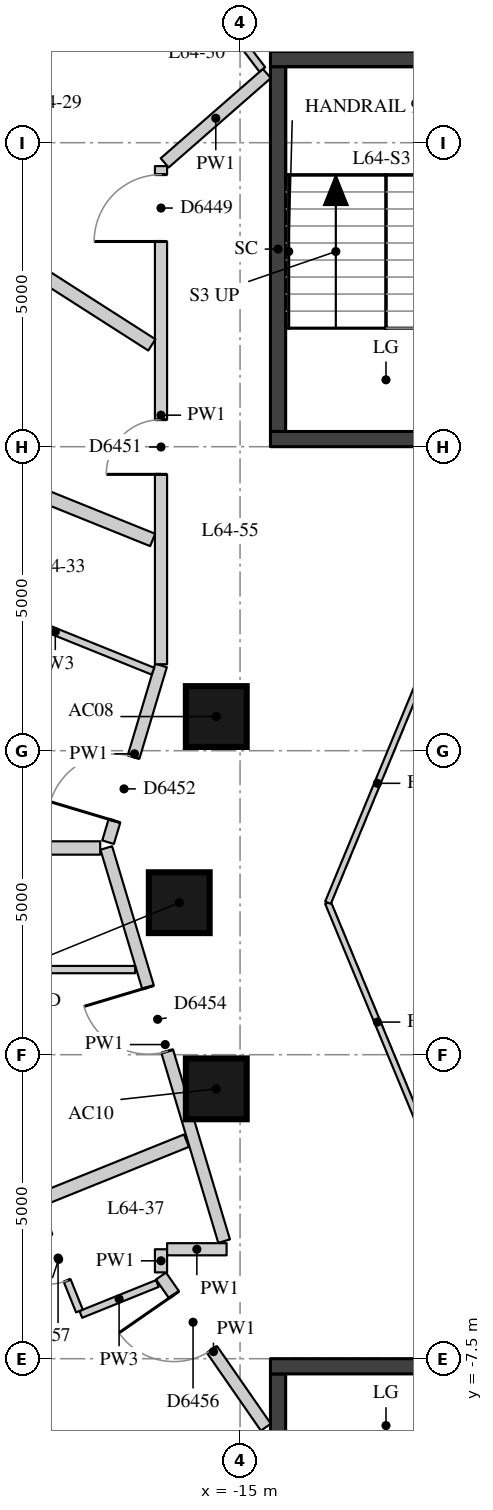
"""IFC4 building model, lengths in metres.
Left out: names, types, materials, properties, quantities, classifications, styles, units other than length and angle.
Written with IfcOpenShell. Run it as: python <this file> out.ifc"""

import sys

from ifc_helpers import new_model, si_unit, direction, frame, frame_2d, origin, origin_2d, place, context, subcontext, project, spatial, rectangle, extrude, element, fill, save


model = new_model("IFC4")
c1 = context("Model", 3, precision=1e-05, world=origin(), true_north=direction((0.0, 1.0)))
c2 = subcontext(c1, "Body", "Model", "MODEL_VIEW")
j1 = project(units=[si_unit("LENGTHUNIT", "METRE"), si_unit("PLANEANGLEUNIT", "RADIAN")], contexts=[c1])
p1 = place(None, origin())
s1 = spatial("IfcSite", under=j1, at=p1, CompositionType="ELEMENT")
p2 = place(p1, origin())
s2 = spatial("IfcBuilding", under=s1, at=p2, CompositionType="ELEMENT")
p3 = place(p2, frame((0.0, 0.0, 225.5)))
s3 = spatial("IfcBuildingStorey", under=s2, at=p3, CompositionType="ELEMENT", Elevation=225.5)
for number, where, z_axis, x_axis in (
    (1, (-15.391, 3.062, 0.0), (0.0, 0.0, 1.0), (1.0, 0.0, 0.0)),
    (2, (-16.0, 0.0, 0.0), (0.0, 0.0, 1.0), (1.0, 0.0, 0.0)),
    (3, (-15.391, -3.062, 0.0), (0.0, 0.0, 1.0), (1.0, 0.0, 0.0)),
):
    element("IfcColumn", number, at=place(p3, frame(where, z_axis=z_axis, x_axis=x_axis)), inside=s3, PredefinedType="COLUMN", context=c2, shape_type="SweptSolid", body=[
        extrude(rectangle(XDim=1.0, YDim=1.0, at=origin_2d()), origin(), (0.0, 0.0, 1.0), 3.3),
    ])
p4 = place(p3, frame((-14.375, 7.75, -0.28), z_axis=(0.0, 0.0, 1.0), x_axis=(0.0, 1.0, 0.0)))
e4 = element("IfcWall", 4, at=p4, inside=s3, PredefinedType="SHEAR", context=c2, shape_type="SweptSolid", body=[
    extrude(rectangle(XDim=6.0, YDim=0.25, at=frame_2d((3.0, 0.0))), origin(), (0.0, 0.0, 1.0), 3.13),
])
for number, where, z_axis, x_axis in (
    (5, (-14.5, 13.875, -0.28), (0.0, 0.0, 1.0), (1.0, 0.0, 0.0)),
    (6, (-14.5, 7.625, -0.28), (0.0, 0.0, 1.0), (1.0, 0.0, 0.0)),
):
    element("IfcWall", number, at=place(p3, frame(where, z_axis=z_axis, x_axis=x_axis)), inside=s3, PredefinedType="SHEAR", context=c2, shape_type="SweptSolid", body=[
        extrude(rectangle(XDim=5.2, YDim=0.25, at=frame_2d((2.6, 0.0))), origin(), (0.0, 0.0, 1.0), 3.13),
    ])
p5 = place(p3, frame((-14.375, -13.75, -0.28), z_axis=(0.0, 0.0, 1.0), x_axis=(0.0, 1.0, 0.0)))
e7 = element("IfcWall", 7, at=p5, inside=s3, PredefinedType="SHEAR", context=c2, shape_type="SweptSolid", body=[
    extrude(rectangle(XDim=6.0, YDim=0.25, at=frame_2d((3.0, 0.0))), origin(), (0.0, 0.0, 1.0), 3.13),
])
p6 = place(p3, frame((-14.5, -7.625, -0.28), z_axis=(0.0, 0.0, 1.0), x_axis=(1.0, 0.0, 0.0)))
e8 = element("IfcWall", 8, at=p6, inside=s3, PredefinedType="SHEAR", context=c2, shape_type="SweptSolid", body=[
    extrude(rectangle(XDim=5.2, YDim=0.25, at=frame_2d((2.6, 0.0))), origin(), (0.0, 0.0, 1.0), 3.13),
])
p7 = place(p3, frame((-14.575, -8.627, 0.0), z_axis=(0.0, 0.0, 1.0), x_axis=(-0.569910381143, 0.821706856163, 0.0)))
e9 = element("IfcWall", 9, at=p7, inside=s3, PredefinedType="PARTITIONING", context=c2, shape_type="SweptSolid", body=[
    extrude(rectangle(XDim=3.026, YDim=0.2, at=frame_2d((1.513, 0.0))), origin(), (0.0, 0.0, 1.0), 2.85),
])
p8 = place(p7, frame((1.552, 0.0, 0.0)))
e10 = element("IfcOpeningElement", 10, at=p8, cuts=e9, PredefinedType="OPENING", context=c2, shape_type="SweptSolid", body=[
    extrude(rectangle(XDim=1.1, YDim=2.1, at=frame_2d((0.55, 1.05))), frame((0.0, 0.11, 0.0), z_axis=(0.0, -1.0, 0.0), x_axis=(1.0, 0.0, 0.0)), (0.0, 0.0, 1.0), 0.22),
])
p9 = place(p3, frame((-16.3, -6.08, 0.0), z_axis=(0.0, 0.0, 1.0), x_axis=(0.0, 1.0, 0.0)))
e11 = element("IfcWall", 11, at=p9, inside=s3, PredefinedType="PARTITIONING", context=c2, shape_type="SweptSolid", body=[
    extrude(rectangle(XDim=0.38, YDim=0.2, at=frame_2d((0.19, 0.0))), origin(), (0.0, 0.0, 1.0), 2.85),
])
p10 = place(p3, frame((-16.2, -5.7, 0.0), z_axis=(0.0, 0.0, 1.0), x_axis=(1.0, 0.0, 0.0)))
e12 = element("IfcWall", 12, at=p10, inside=s3, PredefinedType="PARTITIONING", context=c2, shape_type="SweptSolid", body=[
    extrude(rectangle(XDim=0.979, YDim=0.2, at=frame_2d((0.489, 0.0))), origin(), (0.0, 0.0, 1.0), 2.85),
])
p11 = place(p3, frame((-15.262, -5.567, 0.0), z_axis=(0.0, 0.0, 1.0), x_axis=(-0.28704593875, 0.957916817395, 0.0)))
e13 = element("IfcWall", 13, at=p11, inside=s3, PredefinedType="PARTITIONING", context=c2, shape_type="SweptSolid", body=[
    extrude(rectangle(XDim=6.751, YDim=0.2, at=frame_2d((3.375, 0.0))), origin(), (0.0, 0.0, 1.0), 2.85),
])
p12 = place(p11, frame((3.259, 0.0, 0.0)))
e14 = element("IfcOpeningElement", 14, at=p12, cuts=e13, PredefinedType="OPENING", context=c2, shape_type="SweptSolid", body=[
    extrude(rectangle(XDim=1.1, YDim=2.1, at=frame_2d((0.55, 1.05))), frame((0.0, 0.11, 0.0), z_axis=(0.0, -1.0, 0.0), x_axis=(1.0, 0.0, 0.0)), (0.0, 0.0, 1.0), 0.22),
])
p13 = place(p3, frame((-17.171, 0.995, 0.0), z_axis=(0.0, 0.0, 1.0), x_axis=(0.286919722033, 0.957954629984, 0.0)))
e15 = element("IfcWall", 15, at=p13, inside=s3, PredefinedType="PARTITIONING", context=c2, shape_type="SweptSolid", body=[
    extrude(rectangle(XDim=3.034, YDim=0.2, at=frame_2d((1.517, 0.0))), origin(), (0.0, 0.0, 1.0), 2.85),
])
p14 = place(p13, frame((0.365, 0.0, 0.0)))
e16 = element("IfcOpeningElement", 16, at=p14, cuts=e15, PredefinedType="OPENING", context=c2, shape_type="SweptSolid", body=[
    extrude(rectangle(XDim=1.1, YDim=2.1, at=frame_2d((0.55, 1.05))), frame((0.0, 0.11, 0.0), z_axis=(0.0, -1.0, 0.0), x_axis=(1.0, 0.0, 0.0)), (0.0, 0.0, 1.0), 0.22),
])
p15 = place(p3, frame((-16.3, 3.922, 0.0), z_axis=(0.0, 0.0, 1.0), x_axis=(0.0, 1.0, 0.0)))
e17 = element("IfcWall", 17, at=p15, inside=s3, PredefinedType="PARTITIONING", context=c2, shape_type="SweptSolid", body=[
    extrude(rectangle(XDim=8.193, YDim=0.2, at=frame_2d((4.097, 0.0))), origin(), (0.0, 0.0, 1.0), 2.85),
])
p16 = place(p15, frame((6.953, 0.0, 0.0)))
e18 = element("IfcOpeningElement", 18, at=p16, cuts=e17, PredefinedType="OPENING", context=c2, shape_type="SweptSolid", body=[
    extrude(rectangle(XDim=1.1, YDim=2.1, at=frame_2d((0.55, 1.05))), frame((0.0, 0.11, 0.0), z_axis=(0.0, -1.0, 0.0), x_axis=(1.0, 0.0, 0.0)), (0.0, 0.0, 1.0), 0.22),
])
p17 = place(p15, frame((3.123, 0.0, 0.0)))
e19 = element("IfcOpeningElement", 19, at=p17, cuts=e17, PredefinedType="OPENING", context=c2, shape_type="SweptSolid", body=[
    extrude(rectangle(XDim=0.9, YDim=2.1, at=frame_2d((0.45, 1.05))), frame((0.0, 0.11, 0.0), z_axis=(0.0, -1.0, 0.0), x_axis=(1.0, 0.0, 0.0)), (0.0, 0.0, 1.0), 0.22),
])
p18 = place(p3, frame((-16.24, 12.168, 0.0), z_axis=(0.0, 0.0, 1.0), x_axis=(0.752820521129, 0.658225844956, 0.0)))
e20 = element("IfcWall", 20, at=p18, inside=s3, PredefinedType="PARTITIONING", context=c2, shape_type="SweptSolid", body=[
    extrude(rectangle(XDim=2.232, YDim=0.2, at=frame_2d((1.116, 0.0))), origin(), (0.0, 0.0, 1.0), 2.85),
])
p19 = place(p3, frame((-21.055, 12.121, 0.0), z_axis=(0.0, 0.0, 1.0), x_axis=(0.842286811608, -0.539029616061, 0.0)))
e21 = element("IfcWall", 21, at=p19, inside=s3, PredefinedType="PARTITIONING", context=c2, shape_type="SweptSolid", body=[
    extrude(rectangle(XDim=5.466, YDim=0.22, at=frame_2d((2.733, 0.0))), origin(), (0.0, 0.0, 1.0), 2.85),
])
p20 = place(p3, frame((-22.896, 8.571, 0.0), z_axis=(0.0, 0.0, 1.0), x_axis=(0.927387137769, -0.374103056256, 0.0)))
e22 = element("IfcWall", 22, at=p20, inside=s3, PredefinedType="PARTITIONING", context=c2, shape_type="SweptSolid", body=[
    extrude(rectangle(XDim=6.964, YDim=0.22, at=frame_2d((3.482, 0.0))), origin(), (0.0, 0.0, 1.0), 2.85),
])
p21 = place(p3, frame((-24.4, 0.9, 0.0), z_axis=(0.0, 0.0, 1.0), x_axis=(1.0, 0.0, 0.0)))
e23 = element("IfcWall", 23, at=p21, inside=s3, PredefinedType="PARTITIONING", context=c2, shape_type="SweptSolid", body=[
    extrude(rectangle(XDim=7.1, YDim=0.22, at=frame_2d((3.55, 0.0))), origin(), (0.0, 0.0, 1.0), 2.3),
])
p22 = place(p3, frame((-21.651, -6.241, 0.0), z_axis=(0.0, 0.0, 1.0), x_axis=(0.927390089179, 0.37409573974, 0.0)))
e24 = element("IfcWall", 24, at=p22, inside=s3, PredefinedType="PARTITIONING", context=c2, shape_type="SweptSolid", body=[
    extrude(rectangle(XDim=6.221, YDim=0.22, at=frame_2d((3.11, 0.0))), origin(), (0.0, 0.0, 1.0), 2.85),
])
p23 = place(p3, frame((-14.634, 13.704, 0.0), z_axis=(0.0, 0.0, 1.0), x_axis=(-0.603613230526, 0.797277284221, 0.0)))
e25 = element("IfcWall", 25, at=p23, inside=s3, PredefinedType="PARTITIONING", context=c2, shape_type="SweptSolid", body=[
    extrude(rectangle(XDim=2.115, YDim=0.12, at=frame_2d((1.058, 0.0))), origin(), (0.0, 0.0, 1.0), 2.85),
])
p24 = place(p3, frame((-16.433, 3.808, 0.0), z_axis=(0.0, 0.0, 1.0), x_axis=(-0.927374031513, 0.374135544522, 0.0)))
e26 = element("IfcWall", 26, at=p24, inside=s3, PredefinedType="PARTITIONING", context=c2, shape_type="SweptSolid", body=[
    extrude(rectangle(XDim=3.464, YDim=0.12, at=frame_2d((1.732, 0.0))), origin(), (0.0, 0.0, 1.0), 2.85),
])
p25 = place(p3, frame((-16.725, -1.1, 0.0), z_axis=(0.0, 0.0, 1.0), x_axis=(-1.0, 0.0, 0.0)))
e27 = element("IfcWall", 27, at=p25, inside=s3, PredefinedType="PARTITIONING", context=c2, shape_type="SweptSolid", body=[
    extrude(rectangle(XDim=3.275, YDim=0.12, at=frame_2d((1.638, 0.0))), origin(), (0.0, 0.0, 1.0), 2.3),
])
p26 = place(p3, frame((-16.36, -6.264, 0.0), z_axis=(0.0, 0.0, 1.0), x_axis=(-0.927381089245, -0.374118049967, 0.0)))
e28 = element("IfcWall", 28, at=p26, inside=s3, PredefinedType="PARTITIONING", context=c2, shape_type="SweptSolid", body=[
    extrude(rectangle(XDim=1.357, YDim=0.12, at=frame_2d((0.679, 0.0))), origin(), (0.0, 0.0, 1.0), 2.85),
])
p27 = place(p3, frame((-17.641, -6.716, 0.0), z_axis=(0.0, 0.0, 1.0), x_axis=(-0.374103450988, 0.927386978536, 0.0)))
e29 = element("IfcWall", 29, at=p27, inside=s3, PredefinedType="PARTITIONING", context=c2, shape_type="SweptSolid", body=[
    extrude(rectangle(XDim=1.83, YDim=0.12, at=frame_2d((0.915, 0.0))), origin(), (0.0, 0.0, 1.0), 2.85),
])
p28 = place(p27, frame((0.54, 0.0, 0.0)))
e30 = element("IfcOpeningElement", 30, at=p28, cuts=e29, PredefinedType="OPENING", context=c2, shape_type="SweptSolid", body=[
    extrude(rectangle(XDim=0.8, YDim=2.1, at=frame_2d((0.4, 1.05))), frame((0.0, 0.07, 0.0), z_axis=(0.0, -1.0, 0.0), x_axis=(1.0, 0.0, 0.0)), (0.0, 0.0, 1.0), 0.14),
])
for number, where, z_axis, x_axis in (
    (31, (-11.927, -3.927, 0.0), (0.0, 0.0, 1.0), (-0.383, 0.924, 0.0)),
    (32, (-13.554, 0.0, 0.0), (0.0, 0.0, 1.0), (0.383, 0.924, 0.0)),
):
    element("IfcWall", number, at=place(p3, frame(where, z_axis=z_axis, x_axis=x_axis)), inside=s3, PredefinedType="PARTITIONING", context=c2, shape_type="SweptSolid", body=[
        extrude(rectangle(XDim=4.251, YDim=0.1, at=frame_2d((2.125, 0.0))), origin(), (0.0, 0.0, 1.0), 2.85),
    ])
p29 = place(p16, origin())
e33 = element("IfcDoor", 33, at=p29, inside=s3, OperationType="SINGLE_SWING_LEFT", PredefinedType="DOOR", context=c2, shape_type="SweptSolid", body=[
    extrude(rectangle(XDim=1.1, YDim=2.1, at=frame_2d((0.55, 1.05))), frame((0.0, 0.025, 0.0), z_axis=(0.0, -1.0, 0.0), x_axis=(1.0, 0.0, 0.0)), (0.0, 0.0, 1.0), 0.05),
])
fill(e18, e33)
p30 = place(p17, origin())
e34 = element("IfcDoor", 34, at=p30, inside=s3, OperationType="SINGLE_SWING_LEFT", PredefinedType="DOOR", context=c2, shape_type="SweptSolid", body=[
    extrude(rectangle(XDim=0.9, YDim=2.1, at=frame_2d((0.45, 1.05))), frame((0.0, 0.025, 0.0), z_axis=(0.0, -1.0, 0.0), x_axis=(1.0, 0.0, 0.0)), (0.0, 0.0, 1.0), 0.05),
])
fill(e19, e34)
p31 = place(p14, origin())
e35 = element("IfcDoor", 35, at=p31, inside=s3, OperationType="SINGLE_SWING_LEFT", PredefinedType="DOOR", context=c2, shape_type="SweptSolid", body=[
    extrude(rectangle(XDim=1.1, YDim=2.1, at=frame_2d((0.55, 1.05))), frame((0.0, 0.025, 0.0), z_axis=(0.0, -1.0, 0.0), x_axis=(1.0, 0.0, 0.0)), (0.0, 0.0, 1.0), 0.05),
])
fill(e16, e35)
p32 = place(p12, origin())
e36 = element("IfcDoor", 36, at=p32, inside=s3, OperationType="SINGLE_SWING_RIGHT", PredefinedType="DOOR", context=c2, shape_type="SweptSolid", body=[
    extrude(rectangle(XDim=1.1, YDim=2.1, at=frame_2d((0.55, 1.05))), frame((0.0, 0.025, 0.0), z_axis=(0.0, -1.0, 0.0), x_axis=(1.0, 0.0, 0.0)), (0.0, 0.0, 1.0), 0.05),
])
fill(e14, e36)
p33 = place(p8, origin())
e37 = element("IfcDoor", 37, at=p33, inside=s3, OperationType="SINGLE_SWING_RIGHT", PredefinedType="DOOR", context=c2, shape_type="SweptSolid", body=[
    extrude(rectangle(XDim=1.1, YDim=2.1, at=frame_2d((0.55, 1.05))), frame((0.0, 0.025, 0.0), z_axis=(0.0, -1.0, 0.0), x_axis=(1.0, 0.0, 0.0)), (0.0, 0.0, 1.0), 0.05),
])
fill(e10, e37)
p34 = place(p28, origin())
e38 = element("IfcDoor", 38, at=p34, inside=s3, OperationType="SINGLE_SWING_RIGHT", PredefinedType="DOOR", context=c2, shape_type="SweptSolid", body=[
    extrude(rectangle(XDim=0.8, YDim=2.1, at=frame_2d((0.4, 1.05))), frame((0.0, 0.025, 0.0), z_axis=(0.0, -1.0, 0.0), x_axis=(1.0, 0.0, 0.0)), (0.0, 0.0, 1.0), 0.05),
])
fill(e30, e38)
save(model, sys.argv[1])
